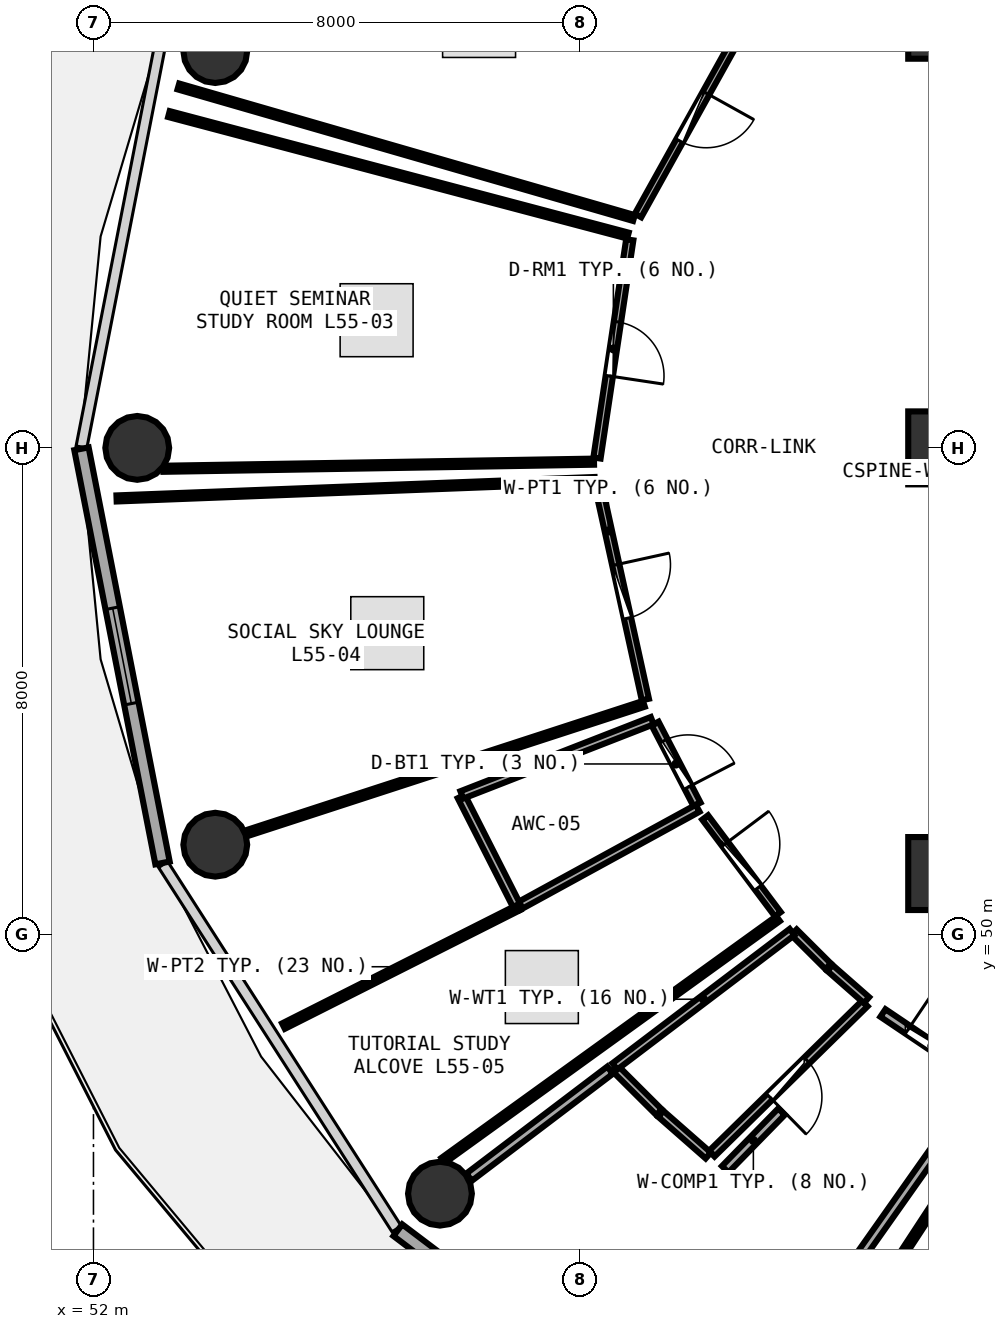
"""IFC4 building model, lengths in metres.
Left out: names, types, materials, properties, quantities, classifications, styles, units other than length and angle.
Written with IfcOpenShell. Run it as: python <this file> out.ifc"""

import sys

from ifc_helpers import new_model, si_unit, direction, frame, frame_2d, origin, origin_2d, place, context, subcontext, project, spatial, rectangle, circle, extrude, element, fill, save


model = new_model("IFC4")
c1 = context("Model", 3, precision=1e-05, world=origin(), true_north=direction((0.0, 1.0)))
c2 = subcontext(c1, "Body", "Model", "MODEL_VIEW")
j1 = project(units=[si_unit("LENGTHUNIT", "METRE"), si_unit("PLANEANGLEUNIT", "RADIAN")], contexts=[c1])
p1 = place(None, origin())
s1 = spatial("IfcSite", under=j1, at=p1, CompositionType="ELEMENT")
p2 = place(p1, origin())
s2 = spatial("IfcBuilding", under=s1, at=p2, CompositionType="ELEMENT")
p3 = place(p2, frame((0.0, 0.0, 215.7)))
s3 = spatial("IfcBuildingStorey", under=s2, at=p3, CompositionType="ELEMENT", Elevation=215.7)
for number, where, z_axis, x_axis in (
    (1, (66.0, 51.0, 0.0), (0.0, 0.0, 1.0), (1.0, 0.0, 0.0)),
    (2, (66.0, 65.0, 0.0), (0.0, 0.0, 1.0), (1.0, 0.0, 0.0)),
    (3, (66.0, 58.0, 0.0), (0.0, 0.0, 1.0), (1.0, 0.0, 0.0)),
):
    element("IfcColumn", number, at=place(p3, frame(where, z_axis=z_axis, x_axis=x_axis)), inside=s3, PredefinedType="PILASTER", context=c2, shape_type="SweptSolid", body=[
        extrude(rectangle(XDim=1.2, YDim=1.2, at=origin_2d()), origin(), (0.0, 0.0, 1.0), 3.75),
    ])
for number, where, z_axis, x_axis in (
    (4, (54.003, 64.526, 0.0), (0.0, 0.0, 1.0), (1.0, 0.0, 0.0)),
    (5, (52.72, 58.0, 0.0), (0.0, 0.0, 1.0), (1.0, 0.0, 0.0)),
    (6, (54.003, 51.474, 0.0), (0.0, 0.0, 1.0), (1.0, 0.0, 0.0)),
    (7, (57.698, 45.736, 0.0), (0.0, 0.0, 1.0), (1.0, 0.0, 0.0)),
):
    element("IfcColumn", number, at=place(p3, frame(where, z_axis=z_axis, x_axis=x_axis)), inside=s3, PredefinedType="COLUMN", context=c2, shape_type="SweptSolid", body=[
        extrude(circle(Radius=0.525, at=origin_2d()), origin(), (0.0, 0.0, 1.0), 3.75),
    ])
p4 = place(p3, frame((51.803, 57.985, 0.0), z_axis=(0.0, 0.0, 1.0), x_axis=(0.192069055673, -0.981381413036, 0.0)))
e8 = element("IfcWall", 8, at=p4, inside=s3, PredefinedType="SOLIDWALL", context=c2, shape_type="SweptSolid", body=[
    extrude(rectangle(XDim=6.94, YDim=0.24, at=frame_2d((3.47, 0.0))), origin(), (0.0, 0.0, 1.0), 3.475),
])
p5 = place(p4, frame((2.67, 0.0, 0.85)))
e9 = element("IfcOpeningElement", 9, at=p5, cuts=e8, PredefinedType="OPENING", context=c2, shape_type="SweptSolid", body=[
    extrude(rectangle(XDim=1.6, YDim=1.45, at=frame_2d((0.8, 0.725))), frame((0.0, 0.13, 0.0), z_axis=(0.0, -1.0, 0.0), x_axis=(1.0, 0.0, 0.0)), (0.0, 0.0, 1.0), 0.26),
])
p6 = place(p3, frame((57.006, 45.135, 0.0), z_axis=(0.0, 0.0, 1.0), x_axis=(0.797701674595, -0.603052268338, 0.0)))
e10 = element("IfcWall", 10, at=p6, inside=s3, PredefinedType="SOLIDWALL", context=c2, shape_type="SweptSolid", body=[
    extrude(rectangle(XDim=7.374, YDim=0.24, at=frame_2d((3.687, 0.0))), origin(), (0.0, 0.0, 1.0), 3.475),
])
p7 = place(p6, frame((2.887, 0.0, 0.85)))
e11 = element("IfcOpeningElement", 11, at=p7, cuts=e10, PredefinedType="OPENING", context=c2, shape_type="SweptSolid", body=[
    extrude(rectangle(XDim=1.6, YDim=1.45, at=frame_2d((0.8, 0.725))), frame((0.0, 0.13, 0.0), z_axis=(0.0, -1.0, 0.0), x_axis=(1.0, 0.0, 0.0)), (0.0, 0.0, 1.0), 0.26),
])
p8 = place(p3, frame((62.759, 65.064, 0.0), z_axis=(0.0, 0.0, 1.0), x_axis=(-0.485877595764, -0.874026865683, 0.0)))
e12 = element("IfcWall", 12, at=p8, inside=s3, PredefinedType="PARTITIONING", context=c2, shape_type="SweptSolid", body=[
    extrude(rectangle(XDim=3.71, YDim=0.12, at=frame_2d((1.855, 0.0))), origin(), (0.0, 0.0, 1.0), 3.025),
])
p9 = place(p8, frame((1.405, 0.0, 0.0)))
e13 = element("IfcOpeningElement", 13, at=p9, cuts=e12, PredefinedType="OPENING", context=c2, shape_type="SweptSolid", body=[
    extrude(rectangle(XDim=0.9, YDim=2.08, at=frame_2d((0.45, 1.04))), frame((0.0, 0.07, 0.0), z_axis=(0.0, -1.0, 0.0), x_axis=(1.0, 0.0, 0.0)), (0.0, 0.0, 1.0), 0.14),
])
p10 = place(p3, frame((60.82, 61.422, 0.0), z_axis=(0.0, 0.0, 1.0), x_axis=(-0.148557592641, -0.988903757536, 0.0)))
e14 = element("IfcWall", 14, at=p10, inside=s3, PredefinedType="PARTITIONING", context=c2, shape_type="SweptSolid", body=[
    extrude(rectangle(XDim=3.629, YDim=0.12, at=frame_2d((1.814, 0.0))), origin(), (0.0, 0.0, 1.0), 3.025),
])
p11 = place(p10, frame((1.364, 0.0, 0.0)))
e15 = element("IfcOpeningElement", 15, at=p11, cuts=e14, PredefinedType="OPENING", context=c2, shape_type="SweptSolid", body=[
    extrude(rectangle(XDim=0.9, YDim=2.08, at=frame_2d((0.45, 1.04))), frame((0.0, 0.07, 0.0), z_axis=(0.0, -1.0, 0.0), x_axis=(1.0, 0.0, 0.0)), (0.0, 0.0, 1.0), 0.14),
])
p12 = place(p3, frame((60.296, 57.414, 0.0), z_axis=(0.0, 0.0, 1.0), x_axis=(0.214769597133, -0.976664742963, 0.0)))
e16 = element("IfcWall", 16, at=p12, inside=s3, PredefinedType="PARTITIONING", context=c2, shape_type="SweptSolid", body=[
    extrude(rectangle(XDim=3.638, YDim=0.12, at=frame_2d((1.819, 0.0))), origin(), (0.0, 0.0, 1.0), 3.48),
])
p13 = place(p12, frame((1.369, 0.0, 0.0)))
e17 = element("IfcOpeningElement", 17, at=p13, cuts=e16, PredefinedType="OPENING", context=c2, shape_type="SweptSolid", body=[
    extrude(rectangle(XDim=0.9, YDim=2.08, at=frame_2d((0.45, 1.04))), frame((0.0, 0.07, 0.0), z_axis=(0.0, -1.0, 0.0), x_axis=(1.0, 0.0, 0.0)), (0.0, 0.0, 1.0), 0.14),
])
p14 = place(p3, frame((61.236, 53.468, 0.0), z_axis=(0.0, 0.0, 1.0), x_axis=(0.460573669508, -0.887621481802, 0.0)))
e18 = element("IfcWall", 18, at=p14, inside=s3, PredefinedType="PLUMBINGWALL", context=c2, shape_type="SweptSolid", body=[
    extrude(rectangle(XDim=1.5, YDim=0.13, at=frame_2d((0.75, 0.0))), origin(), (0.0, 0.0, 1.0), 3.235),
])
p15 = place(p14, frame((0.32, 0.0, 0.0)))
e19 = element("IfcOpeningElement", 19, at=p15, cuts=e18, PredefinedType="OPENING", context=c2, shape_type="SweptSolid", body=[
    extrude(rectangle(XDim=0.86, YDim=2.05, at=frame_2d((0.43, 1.025))), frame((0.0, 0.075, 0.0), z_axis=(0.0, -1.0, 0.0), x_axis=(1.0, 0.0, 0.0)), (0.0, 0.0, 1.0), 0.15),
])
p16 = place(p3, frame((62.06, 51.922, 0.0), z_axis=(0.0, 0.0, 1.0), x_axis=(0.600647163637, -0.799514218019, 0.0)))
e20 = element("IfcWall", 20, at=p16, inside=s3, PredefinedType="PARTITIONING", context=c2, shape_type="SweptSolid", body=[
    extrude(rectangle(XDim=1.991, YDim=0.12, at=frame_2d((0.996, 0.0))), origin(), (0.0, 0.0, 1.0), 3.025),
])
p17 = place(p16, frame((0.546, 0.0, 0.0)))
e21 = element("IfcOpeningElement", 21, at=p17, cuts=e20, PredefinedType="OPENING", context=c2, shape_type="SweptSolid", body=[
    extrude(rectangle(XDim=0.9, YDim=2.08, at=frame_2d((0.45, 1.04))), frame((0.0, 0.07, 0.0), z_axis=(0.0, -1.0, 0.0), x_axis=(1.0, 0.0, 0.0)), (0.0, 0.0, 1.0), 0.14),
])
p18 = place(p3, frame((64.686, 48.863, 0.0), z_axis=(0.0, 0.0, 1.0), x_axis=(-0.713685369918, -0.700466410875, 0.0)))
e22 = element("IfcWall", 22, at=p18, inside=s3, PredefinedType="PLUMBINGWALL", context=c2, shape_type="SweptSolid", body=[
    extrude(rectangle(XDim=3.528, YDim=0.13, at=frame_2d((1.764, 0.0))), origin(), (0.0, 0.0, 1.0), 3.175),
])
p19 = place(p18, frame((1.334, 0.0, 0.0)))
e23 = element("IfcOpeningElement", 23, at=p19, cuts=e22, PredefinedType="OPENING", context=c2, shape_type="SweptSolid", body=[
    extrude(rectangle(XDim=0.86, YDim=2.05, at=frame_2d((0.43, 1.025))), frame((0.0, 0.075, 0.0), z_axis=(0.0, -1.0, 0.0), x_axis=(1.0, 0.0, 0.0)), (0.0, 0.0, 1.0), 0.15),
])
p20 = place(p3, frame((64.984, 48.707, 0.0), z_axis=(0.0, 0.0, 1.0), x_axis=(0.829408373073, -0.558642775553, 0.0)))
e24 = element("IfcWall", 24, at=p20, inside=s3, PredefinedType="PARTITIONING", context=c2, shape_type="SweptSolid", body=[
    extrude(rectangle(XDim=1.94, YDim=0.15, at=frame_2d((0.97, 0.0))), origin(), (0.0, 0.0, 1.0), 3.025),
])
p21 = place(p20, frame((0.495, 0.0, 0.0)))
e25 = element("IfcOpeningElement", 25, at=p21, cuts=e24, PredefinedType="OPENING", context=c2, shape_type="SweptSolid", body=[
    extrude(rectangle(XDim=0.95, YDim=2.08, at=frame_2d((0.475, 1.04))), frame((0.0, 0.085, 0.0), z_axis=(0.0, -1.0, 0.0), x_axis=(1.0, 0.0, 0.0)), (0.0, 0.0, 1.0), 0.17),
])
p22 = place(p3, frame((63.514, 42.004, 0.0), z_axis=(0.0, 0.0, 1.0), x_axis=(0.547776057645, 0.836625000028, 0.0)))
e26 = element("IfcWall", 26, at=p22, inside=s3, PredefinedType="PARTITIONING", context=c2, shape_type="SweptSolid", body=[
    extrude(rectangle(XDim=6.381, YDim=0.1, at=frame_2d((3.19, 0.0))), origin(), (0.0, 0.0, 1.0), 3.025),
])
p23 = place(p3, frame((60.889, 61.78, 0.0), z_axis=(0.0, 0.0, 1.0), x_axis=(-0.960734399679, 0.277469661899, 0.0)))
e27 = element("IfcWall", 27, at=p23, inside=s3, PredefinedType="PARTITIONING", context=c2, shape_type="SweptSolid", body=[
    extrude(rectangle(XDim=7.798, YDim=0.1, at=frame_2d((3.899, 0.0))), origin(), (0.0, 0.0, 1.0), 3.075),
])
p24 = place(p3, frame((60.232, 57.773, 0.0), z_axis=(0.0, 0.0, 1.0), x_axis=(-0.999864271248, -0.016475408379, 0.0)))
e28 = element("IfcWall", 28, at=p24, inside=s3, PredefinedType="PARTITIONING", context=c2, shape_type="SweptSolid", body=[
    extrude(rectangle(XDim=7.083, YDim=0.1, at=frame_2d((3.542, 0.0))), origin(), (0.0, 0.0, 1.0), 3.175),
])
p25 = place(p3, frame((53.241, 63.49, 0.0), z_axis=(0.0, 0.0, 1.0), x_axis=(0.966701361123, -0.25590716755, 0.0)))
e29 = element("IfcWall", 29, at=p25, inside=s3, PredefinedType="PARTITIONING", context=c2, shape_type="SweptSolid", body=[
    extrude(rectangle(XDim=7.81, YDim=0.1, at=frame_2d((3.905, 0.0))), origin(), (0.0, 0.0, 1.0), 3.075),
])
p26 = place(p3, frame((61.052, 53.791, 0.0), z_axis=(0.0, 0.0, 1.0), x_axis=(-0.950863645771, -0.309609959708, 0.0)))
e30 = element("IfcWall", 30, at=p26, inside=s3, PredefinedType="PARTITIONING", context=c2, shape_type="SweptSolid", body=[
    extrude(rectangle(XDim=6.87, YDim=0.1, at=frame_2d((3.435, 0.0))), origin(), (0.0, 0.0, 1.0), 3.175),
])
p27 = place(p3, frame((52.38, 57.168, 0.0), z_axis=(0.0, 0.0, 1.0), x_axis=(0.999258468257, 0.038503423452, 0.0)))
e31 = element("IfcWall", 31, at=p27, inside=s3, PredefinedType="PARTITIONING", context=c2, shape_type="SweptSolid", body=[
    extrude(rectangle(XDim=7.869, YDim=0.1, at=frame_2d((3.935, 0.0))), origin(), (0.0, 0.0, 1.0), 3.075),
])
p28 = place(p3, frame((61.937, 52.073, 0.0), z_axis=(0.0, 0.0, 1.0), x_axis=(-0.877295143091, -0.479951280767, 0.0)))
e32 = element("IfcWall", 32, at=p28, inside=s3, PredefinedType="PLUMBINGWALL", context=c2, shape_type="SweptSolid", body=[
    extrude(rectangle(XDim=3.36, YDim=0.13, at=frame_2d((1.68, 0.0))), origin(), (0.0, 0.0, 1.0), 3.025),
])
p29 = place(p3, frame((58.962, 50.469, 0.0), z_axis=(0.0, 0.0, 1.0), x_axis=(-0.452384505313, 0.891822997771, 0.0)))
e33 = element("IfcWall", 33, at=p29, inside=s3, PredefinedType="PLUMBINGWALL", context=c2, shape_type="SweptSolid", body=[
    extrude(rectangle(XDim=2.018, YDim=0.13, at=frame_2d((1.009, 0.0))), origin(), (0.0, 0.0, 1.0), 3.025),
])
p30 = place(p3, frame((58.059, 52.293, 0.0), z_axis=(0.0, 0.0, 1.0), x_axis=(0.931712585556, 0.363196445352, 0.0)))
e34 = element("IfcWall", 34, at=p30, inside=s3, PredefinedType="PLUMBINGWALL", context=c2, shape_type="SweptSolid", body=[
    extrude(rectangle(XDim=3.36, YDim=0.13, at=frame_2d((1.68, 0.0))), origin(), (0.0, 0.0, 1.0), 3.175),
])
p31 = place(p3, frame((63.26, 50.259, 0.0), z_axis=(0.0, 0.0, 1.0), x_axis=(-0.810850730514, -0.585253016076, 0.0)))
e35 = element("IfcWall", 35, at=p31, inside=s3, PredefinedType="PARTITIONING", context=c2, shape_type="SweptSolid", body=[
    extrude(rectangle(XDim=6.793, YDim=0.1, at=frame_2d((3.396, 0.0))), origin(), (0.0, 0.0, 1.0), 3.175),
])
p32 = place(p3, frame((55.125, 48.491, 0.0), z_axis=(0.0, 0.0, 1.0), x_axis=(0.892902240534, 0.450250584507, 0.0)))
e36 = element("IfcWall", 36, at=p32, inside=s3, PredefinedType="PARTITIONING", context=c2, shape_type="SweptSolid", body=[
    extrude(rectangle(XDim=4.337, YDim=0.1, at=frame_2d((2.169, 0.0))), origin(), (0.0, 0.0, 1.0), 3.075),
])
p33 = place(p3, frame((63.519, 50.036, 0.0), z_axis=(0.0, 0.0, 1.0), x_axis=(0.708179895313, -0.706032036012, 0.0)))
e37 = element("IfcWall", 37, at=p33, inside=s3, PredefinedType="PLUMBINGWALL", context=c2, shape_type="SweptSolid", body=[
    extrude(rectangle(XDim=0.796, YDim=0.13, at=frame_2d((0.398, 0.0))), origin(), (0.0, 0.0, 1.0), 3.025),
])
p34 = place(p3, frame((64.112, 49.447, 0.0), z_axis=(0.0, 0.0, 1.0), x_axis=(0.751480759656, -0.659755005943, 0.0)))
e38 = element("IfcWall", 38, at=p34, inside=s3, PredefinedType="PLUMBINGWALL", context=c2, shape_type="SweptSolid", body=[
    extrude(rectangle(XDim=0.801, YDim=0.13, at=frame_2d((0.401, 0.0))), origin(), (0.0, 0.0, 1.0), 3.48),
])
p35 = place(p3, frame((62.111, 46.363, 0.0), z_axis=(0.0, 0.0, 1.0), x_axis=(-0.751599507382, 0.659619724162, 0.0)))
e39 = element("IfcWall", 39, at=p35, inside=s3, PredefinedType="PLUMBINGWALL", context=c2, shape_type="SweptSolid", body=[
    extrude(rectangle(XDim=1.038, YDim=0.13, at=frame_2d((0.519, 0.0))), origin(), (0.0, 0.0, 1.0), 3.48),
])
p36 = place(p3, frame((61.302, 47.075, 0.0), z_axis=(0.0, 0.0, 1.0), x_axis=(-0.707936648292, 0.706275938996, 0.0)))
e40 = element("IfcWall", 40, at=p36, inside=s3, PredefinedType="PLUMBINGWALL", context=c2, shape_type="SweptSolid", body=[
    extrude(rectangle(XDim=1.029, YDim=0.13, at=frame_2d((0.515, 0.0))), origin(), (0.0, 0.0, 1.0), 3.025),
])
p37 = place(p3, frame((60.575, 47.828, 0.0), z_axis=(0.0, 0.0, 1.0), x_axis=(0.79681650582, 0.604221363453, 0.0)))
e41 = element("IfcWall", 41, at=p37, inside=s3, PredefinedType="PLUMBINGWALL", context=c2, shape_type="SweptSolid", body=[
    extrude(rectangle(XDim=3.657, YDim=0.13, at=frame_2d((1.829, 0.0))), origin(), (0.0, 0.0, 1.0), 3.175),
])
p38 = place(p3, frame((66.62, 47.556, 0.0), z_axis=(0.0, 0.0, 1.0), x_axis=(-0.576552043051, -0.817060427174, 0.0)))
e42 = element("IfcWall", 42, at=p38, inside=s3, PredefinedType="PARTITIONING", context=c2, shape_type="SweptSolid", body=[
    extrude(rectangle(XDim=7.309, YDim=0.15, at=frame_2d((3.654, 0.0))), origin(), (0.0, 0.0, 1.0), 3.025),
])
p39 = place(p3, frame((58.177, 46.007, 0.0), z_axis=(0.0, 0.0, 1.0), x_axis=(0.796666201995, 0.604419525329, 0.0)))
e43 = element("IfcWall", 43, at=p39, inside=s3, PredefinedType="PARTITIONING", context=c2, shape_type="SweptSolid", body=[
    extrude(rectangle(XDim=2.911, YDim=0.15, at=frame_2d((1.455, 0.0))), origin(), (0.0, 0.0, 1.0), 3.025),
])
p40 = place(p3, frame((62.39, 46.137, 0.0), z_axis=(0.0, 0.0, 1.0), x_axis=(0.699044346204, 0.715078318816, 0.0)))
e44 = element("IfcWall", 44, at=p40, inside=s3, PredefinedType="PARTITIONING", context=c2, shape_type="SweptSolid", body=[
    extrude(rectangle(XDim=1.325, YDim=0.15, at=frame_2d((0.662, 0.0))), origin(), (0.0, 0.0, 1.0), 3.175),
])
p41 = place(p5, origin())
e45 = element("IfcWindow", 45, at=p41, inside=s3, PartitioningType="SINGLE_PANEL", PredefinedType="WINDOW", context=c2, shape_type="SweptSolid", body=[
    extrude(rectangle(XDim=1.6, YDim=1.45, at=frame_2d((0.8, 0.725))), frame((0.0, 0.03, 0.0), z_axis=(0.0, -1.0, 0.0), x_axis=(1.0, 0.0, 0.0)), (0.0, 0.0, 1.0), 0.06),
])
fill(e9, e45)
p42 = place(p9, origin())
e46 = element("IfcDoor", 46, at=p42, inside=s3, OperationType="SINGLE_SWING_LEFT", PredefinedType="DOOR", context=c2, shape_type="SweptSolid", body=[
    extrude(rectangle(XDim=0.9, YDim=2.08, at=frame_2d((0.45, 1.04))), frame((0.0, 0.025, 0.0), z_axis=(0.0, -1.0, 0.0), x_axis=(1.0, 0.0, 0.0)), (0.0, 0.0, 1.0), 0.05),
])
fill(e13, e46)
p43 = place(p11, origin())
e47 = element("IfcDoor", 47, at=p43, inside=s3, OperationType="SINGLE_SWING_RIGHT", PredefinedType="DOOR", context=c2, shape_type="SweptSolid", body=[
    extrude(rectangle(XDim=0.9, YDim=2.08, at=frame_2d((0.45, 1.04))), frame((0.0, 0.025, 0.0), z_axis=(0.0, -1.0, 0.0), x_axis=(1.0, 0.0, 0.0)), (0.0, 0.0, 1.0), 0.05),
])
fill(e15, e47)
p44 = place(p13, origin())
e48 = element("IfcDoor", 48, at=p44, inside=s3, OperationType="SINGLE_SWING_LEFT", PredefinedType="DOOR", context=c2, shape_type="SweptSolid", body=[
    extrude(rectangle(XDim=0.9, YDim=2.08, at=frame_2d((0.45, 1.04))), frame((0.0, 0.025, 0.0), z_axis=(0.0, -1.0, 0.0), x_axis=(1.0, 0.0, 0.0)), (0.0, 0.0, 1.0), 0.05),
])
fill(e17, e48)
p45 = place(p15, origin())
e49 = element("IfcDoor", 49, at=p45, inside=s3, OperationType="SINGLE_SWING_RIGHT", PredefinedType="DOOR", context=c2, shape_type="SweptSolid", body=[
    extrude(rectangle(XDim=0.86, YDim=2.05, at=frame_2d((0.43, 1.025))), frame((0.0, 0.025, 0.0), z_axis=(0.0, -1.0, 0.0), x_axis=(1.0, 0.0, 0.0)), (0.0, 0.0, 1.0), 0.05),
])
fill(e19, e49)
p46 = place(p17, origin())
e50 = element("IfcDoor", 50, at=p46, inside=s3, OperationType="SINGLE_SWING_LEFT", PredefinedType="DOOR", context=c2, shape_type="SweptSolid", body=[
    extrude(rectangle(XDim=0.9, YDim=2.08, at=frame_2d((0.45, 1.04))), frame((0.0, 0.025, 0.0), z_axis=(0.0, -1.0, 0.0), x_axis=(1.0, 0.0, 0.0)), (0.0, 0.0, 1.0), 0.05),
])
fill(e21, e50)
p47 = place(p19, origin())
e51 = element("IfcDoor", 51, at=p47, inside=s3, OperationType="SINGLE_SWING_RIGHT", PredefinedType="DOOR", context=c2, shape_type="SweptSolid", body=[
    extrude(rectangle(XDim=0.86, YDim=2.05, at=frame_2d((0.43, 1.025))), frame((0.0, 0.025, 0.0), z_axis=(0.0, -1.0, 0.0), x_axis=(1.0, 0.0, 0.0)), (0.0, 0.0, 1.0), 0.05),
])
fill(e23, e51)
p48 = place(p21, origin())
e52 = element("IfcDoor", 52, at=p48, inside=s3, OperationType="SINGLE_SWING_LEFT", PredefinedType="DOOR", context=c2, shape_type="SweptSolid", body=[
    extrude(rectangle(XDim=0.95, YDim=2.08, at=frame_2d((0.475, 1.04))), frame((0.0, 0.025, 0.0), z_axis=(0.0, -1.0, 0.0), x_axis=(1.0, 0.0, 0.0)), (0.0, 0.0, 1.0), 0.05),
])
fill(e25, e52)
save(model, sys.argv[1])
